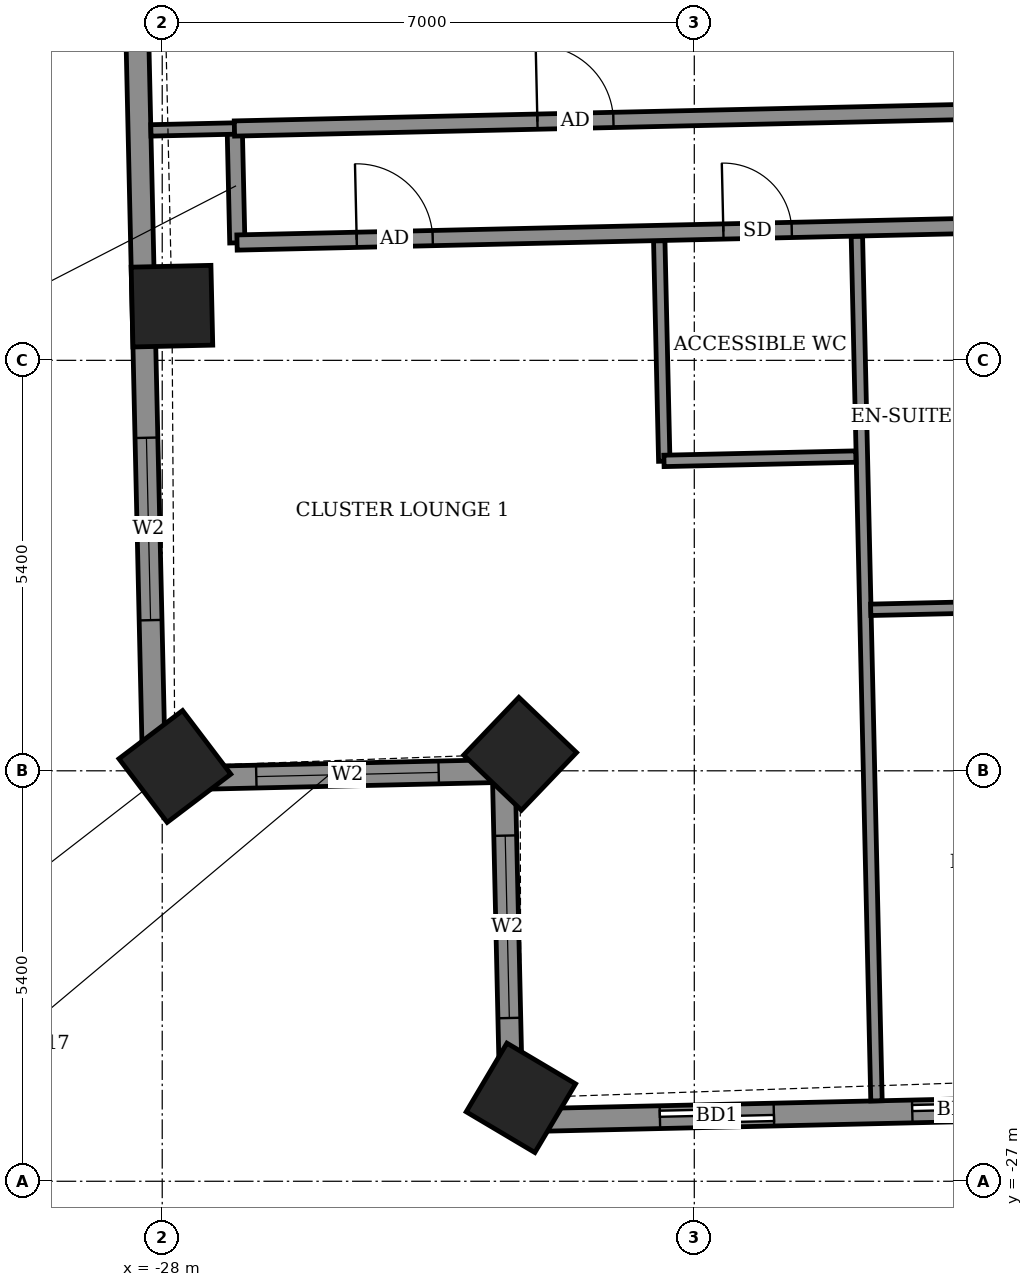
"""IFC4 building model, lengths in metres.
Left out: names, types, materials, properties, quantities, classifications, styles, units other than length and angle.
Written with IfcOpenShell. Run it as: python <this file> out.ifc"""

import sys

from ifc_helpers import new_model, si_unit, direction, frame, frame_2d, origin, origin_2d, place, context, subcontext, project, spatial, rectangle, extrude, element, fill, save


model = new_model("IFC4")
c1 = context("Model", 3, precision=1e-05, world=origin(), true_north=direction((0.0, 1.0)))
c2 = subcontext(c1, "Body", "Model", "MODEL_VIEW")
j1 = project(units=[si_unit("LENGTHUNIT", "METRE"), si_unit("PLANEANGLEUNIT", "RADIAN")], contexts=[c1])
p1 = place(None, origin())
s1 = spatial("IfcSite", under=j1, at=p1, CompositionType="ELEMENT")
p2 = place(p1, origin())
s2 = spatial("IfcBuilding", under=s1, at=p2, CompositionType="ELEMENT")
p3 = place(p2, frame((0.0, 0.0, 245.5)))
s3 = spatial("IfcBuildingStorey", under=s2, at=p3, CompositionType="ELEMENT", Elevation=245.5)
for number, where, z_axis, x_axis in (
    (1, (-27.872, -15.487, -0.55), (0.0, 0.0, 1.0), (0.023, -1.0, 0.0)),
    (2, (-27.833, -21.543, -0.55), (0.0, 0.0, 1.0), (0.604, -0.797, 0.0)),
    (3, (-23.291, -21.376, -0.55), (0.0, 0.0, 1.0), (0.723, -0.691, 0.0)),
    (4, (-23.281, -25.902, -0.55), (0.0, 0.0, 1.0), (0.86, -0.51, 0.0)),
):
    element("IfcColumn", number, at=place(p3, frame(where, z_axis=z_axis, x_axis=x_axis)), inside=s3, PredefinedType="COLUMN", context=c2, shape_type="SweptSolid", body=[
        extrude(rectangle(XDim=1.05, YDim=1.05, at=origin_2d()), origin(), (0.0, 0.0, 1.0), 3.6),
    ])
p4 = place(p3, frame((-28.403, -8.61, 0.0), z_axis=(0.0, 0.0, 1.0), x_axis=(0.022680342038, -0.999742767958, 0.0)))
e5 = element("IfcWall", 5, at=p4, inside=s3, PredefinedType="SOLIDWALL", context=c2, shape_type="SweptSolid", body=[
    extrude(rectangle(XDim=13.1, YDim=0.3, at=frame_2d((6.55, 0.0))), origin(), (0.0, 0.0, 1.0), 2.55),
])
p5 = place(p4, frame((1.937, 0.0, 0.0)))
e6 = element("IfcOpeningElement", 6, at=p5, cuts=e5, PredefinedType="OPENING", context=c2, shape_type="SweptSolid", body=[
    extrude(rectangle(XDim=1.5, YDim=2.4, at=frame_2d((0.75, 1.2))), frame((0.0, 0.16, 0.0), z_axis=(0.0, -1.0, 0.0), x_axis=(1.0, 0.0, 0.0)), (0.0, 0.0, 1.0), 0.32),
])
p6 = place(p4, frame((8.611, 0.0, 0.9)))
e7 = element("IfcOpeningElement", 7, at=p6, cuts=e5, PredefinedType="OPENING", context=c2, shape_type="SweptSolid", body=[
    extrude(rectangle(XDim=2.4, YDim=1.5, at=frame_2d((1.2, 0.75))), frame((0.0, 0.16, 0.0), z_axis=(0.0, -1.0, 0.0), x_axis=(1.0, 0.0, 0.0)), (0.0, 0.0, 1.0), 0.32),
])
p7 = place(p3, frame((-28.106, -21.707, 0.0), z_axis=(0.0, 0.0, 1.0), x_axis=(0.999739556364, 0.022821468877, 0.0)))
e8 = element("IfcWall", 8, at=p7, inside=s3, PredefinedType="SOLIDWALL", context=c2, shape_type="SweptSolid", body=[
    extrude(rectangle(XDim=4.6, YDim=0.3, at=frame_2d((2.3, 0.0))), origin(), (0.0, 0.0, 1.0), 2.55),
])
p8 = place(p7, frame((1.344, 0.0, 0.9)))
e9 = element("IfcOpeningElement", 9, at=p8, cuts=e8, PredefinedType="OPENING", context=c2, shape_type="SweptSolid", body=[
    extrude(rectangle(XDim=2.4, YDim=1.5, at=frame_2d((1.2, 0.75))), frame((0.0, 0.16, 0.0), z_axis=(0.0, -1.0, 0.0), x_axis=(1.0, 0.0, 0.0)), (0.0, 0.0, 1.0), 0.32),
])
p9 = place(p3, frame((-23.507, -21.602, 0.0), z_axis=(0.0, 0.0, 1.0), x_axis=(0.022609285172, -0.999744377441, 0.0)))
e10 = element("IfcWall", 10, at=p9, inside=s3, PredefinedType="SOLIDWALL", context=c2, shape_type="SweptSolid", body=[
    extrude(rectangle(XDim=4.6, YDim=0.3, at=frame_2d((2.3, 0.0))), origin(), (0.0, 0.0, 1.0), 2.55),
])
p10 = place(p9, frame((0.851, 0.0, 0.9)))
e11 = element("IfcOpeningElement", 11, at=p10, cuts=e10, PredefinedType="OPENING", context=c2, shape_type="SweptSolid", body=[
    extrude(rectangle(XDim=2.4, YDim=1.5, at=frame_2d((1.2, 0.75))), frame((0.0, 0.16, 0.0), z_axis=(0.0, -1.0, 0.0), x_axis=(1.0, 0.0, 0.0)), (0.0, 0.0, 1.0), 0.32),
])
p11 = place(p3, frame((-23.403, -26.201, 0.0), z_axis=(0.0, 0.0, 1.0), x_axis=(0.999742770494, 0.022680230258, 0.0)))
e12 = element("IfcWall", 12, at=p11, inside=s3, PredefinedType="SOLIDWALL", context=c2, shape_type="SweptSolid", body=[
    extrude(rectangle(XDim=43.908, YDim=0.3, at=frame_2d((21.954, 0.0))), origin(), (0.0, 0.0, 1.0), 2.55),
])
p12 = place(p11, frame((1.951, 0.0, 0.0)))
e13 = element("IfcOpeningElement", 13, at=p12, cuts=e12, PredefinedType="OPENING", context=c2, shape_type="SweptSolid", body=[
    extrude(rectangle(XDim=1.5, YDim=2.4, at=frame_2d((0.75, 1.2))), frame((0.0, 0.16, 0.0), z_axis=(0.0, -1.0, 0.0), x_axis=(1.0, 0.0, 0.0)), (0.0, 0.0, 1.0), 0.32),
])
p13 = place(p11, frame((5.272, 0.0, 0.0)))
e14 = element("IfcOpeningElement", 14, at=p13, cuts=e12, PredefinedType="OPENING", context=c2, shape_type="SweptSolid", body=[
    extrude(rectangle(XDim=1.2, YDim=2.4, at=frame_2d((0.6, 1.2))), frame((0.0, 0.16, 0.0), z_axis=(0.0, -1.0, 0.0), x_axis=(1.0, 0.0, 0.0)), (0.0, 0.0, 1.0), 0.32),
])
p14 = place(p11, frame((10.475, 0.0, 0.0)))
e15 = element("IfcOpeningElement", 15, at=p14, cuts=e12, PredefinedType="OPENING", context=c2, shape_type="SweptSolid", body=[
    extrude(rectangle(XDim=1.5, YDim=2.4, at=frame_2d((0.75, 1.2))), frame((0.0, 0.16, 0.0), z_axis=(0.0, -1.0, 0.0), x_axis=(1.0, 0.0, 0.0)), (0.0, 0.0, 1.0), 0.32),
])
p15 = place(p11, frame((15.53, 0.0, 0.0)))
e16 = element("IfcOpeningElement", 16, at=p15, cuts=e12, PredefinedType="OPENING", context=c2, shape_type="SweptSolid", body=[
    extrude(rectangle(XDim=1.5, YDim=2.4, at=frame_2d((0.75, 1.2))), frame((0.0, 0.16, 0.0), z_axis=(0.0, -1.0, 0.0), x_axis=(1.0, 0.0, 0.0)), (0.0, 0.0, 1.0), 0.32),
])
p16 = place(p11, frame((18.939, 0.0, 0.0)))
e17 = element("IfcOpeningElement", 17, at=p16, cuts=e12, PredefinedType="OPENING", context=c2, shape_type="SweptSolid", body=[
    extrude(rectangle(XDim=1.5, YDim=2.4, at=frame_2d((0.75, 1.2))), frame((0.0, 0.16, 0.0), z_axis=(0.0, -1.0, 0.0), x_axis=(1.0, 0.0, 0.0)), (0.0, 0.0, 1.0), 0.32),
])
p17 = place(p11, frame((23.489, 0.0, 0.0)))
e18 = element("IfcOpeningElement", 18, at=p17, cuts=e12, PredefinedType="OPENING", context=c2, shape_type="SweptSolid", body=[
    extrude(rectangle(XDim=1.5, YDim=2.4, at=frame_2d((0.75, 1.2))), frame((0.0, 0.16, 0.0), z_axis=(0.0, -1.0, 0.0), x_axis=(1.0, 0.0, 0.0)), (0.0, 0.0, 1.0), 0.32),
])
p18 = place(p11, frame((26.898, 0.0, 0.0)))
e19 = element("IfcOpeningElement", 19, at=p18, cuts=e12, PredefinedType="OPENING", context=c2, shape_type="SweptSolid", body=[
    extrude(rectangle(XDim=1.5, YDim=2.4, at=frame_2d((0.75, 1.2))), frame((0.0, 0.16, 0.0), z_axis=(0.0, -1.0, 0.0), x_axis=(1.0, 0.0, 0.0)), (0.0, 0.0, 1.0), 0.32),
])
p19 = place(p11, frame((32.05, 0.0, 0.0)))
e20 = element("IfcOpeningElement", 20, at=p19, cuts=e12, PredefinedType="OPENING", context=c2, shape_type="SweptSolid", body=[
    extrude(rectangle(XDim=1.5, YDim=2.4, at=frame_2d((0.75, 1.2))), frame((0.0, 0.16, 0.0), z_axis=(0.0, -1.0, 0.0), x_axis=(1.0, 0.0, 0.0)), (0.0, 0.0, 1.0), 0.32),
])
p20 = place(p11, frame((37.382, 0.0, 0.0)))
e21 = element("IfcOpeningElement", 21, at=p20, cuts=e12, PredefinedType="OPENING", context=c2, shape_type="SweptSolid", body=[
    extrude(rectangle(XDim=1.5, YDim=2.4, at=frame_2d((0.75, 1.2))), frame((0.0, 0.16, 0.0), z_axis=(0.0, -1.0, 0.0), x_axis=(1.0, 0.0, 0.0)), (0.0, 0.0, 1.0), 0.32),
])
p21 = place(p11, frame((40.057, 0.0, 0.9)))
e22 = element("IfcOpeningElement", 22, at=p21, cuts=e12, PredefinedType="OPENING", context=c2, shape_type="SweptSolid", body=[
    extrude(rectangle(XDim=2.4, YDim=1.5, at=frame_2d((1.2, 0.75))), frame((0.0, 0.16, 0.0), z_axis=(0.0, -1.0, 0.0), x_axis=(1.0, 0.0, 0.0)), (0.0, 0.0, 1.0), 0.32),
])
p22 = place(p3, frame((-18.603, -25.942, 0.0), z_axis=(0.0, 0.0, 1.0), x_axis=(-0.022684842063, 0.99974266586, 0.0)))
e23 = element("IfcWall", 23, at=p22, inside=s3, PredefinedType="PARTITIONING", context=c2, shape_type="SweptSolid", body=[
    extrude(rectangle(XDim=11.376, YDim=0.15, at=frame_2d((5.688, 0.0))), origin(), (0.0, 0.0, 1.0), 2.55),
])
p23 = place(p3, frame((-18.679, -19.482, 0.0), z_axis=(0.0, 0.0, 1.0), x_axis=(0.999740478815, 0.022781023197, 0.0)))
e24 = element("IfcWall", 24, at=p23, inside=s3, PredefinedType="PARTITIONING", context=c2, shape_type="SweptSolid", body=[
    extrude(rectangle(XDim=2.325, YDim=0.15, at=frame_2d((1.163, 0.0))), origin(), (0.0, 0.0, 1.0), 3.05),
])
p24 = place(p3, frame((-21.395, -17.527, 0.0), z_axis=(0.0, 0.0, 1.0), x_axis=(-0.022730967319, 0.999741618182, 0.0)))
e25 = element("IfcWall", 25, at=p24, inside=s3, PredefinedType="PARTITIONING", context=c2, shape_type="SweptSolid", body=[
    extrude(rectangle(XDim=2.9, YDim=0.15, at=frame_2d((1.45, 0.0))), origin(), (0.0, 0.0, 1.0), 3.05),
])
p25 = place(p3, frame((-21.399, -17.523, 0.0), z_axis=(0.0, 0.0, 1.0), x_axis=(0.9997461113, 0.022532486354, 0.0)))
e26 = element("IfcWall", 26, at=p25, inside=s3, PredefinedType="PARTITIONING", context=c2, shape_type="SweptSolid", body=[
    extrude(rectangle(XDim=2.525, YDim=0.15, at=frame_2d((1.262, 0.0))), origin(), (0.0, 0.0, 1.0), 3.05),
])
p26 = place(p3, frame((-27.012, -14.654, 0.0), z_axis=(0.0, 0.0, 1.0), x_axis=(-0.022617910375, 0.999744182344, 0.0)))
e27 = element("IfcWall", 27, at=p26, inside=s3, PredefinedType="PARTITIONING", context=c2, shape_type="SweptSolid", body=[
    extrude(rectangle(XDim=1.5, YDim=0.2, at=frame_2d((0.75, 0.0))), origin(), (0.0, 0.0, 1.0), 3.05),
])
p27 = place(p3, frame((-27.016, -14.65, 0.0), z_axis=(0.0, 0.0, 1.0), x_axis=(0.999742874861, 0.022675629315, 0.0)))
e28 = element("IfcWall", 28, at=p27, inside=s3, PredefinedType="PARTITIONING", context=c2, shape_type="SweptSolid", body=[
    extrude(rectangle(XDim=50.883, YDim=0.2, at=frame_2d((25.442, 0.0))), origin(), (0.0, 0.0, 1.0), 3.05),
])
p28 = place(p27, frame((1.575, 0.0, 0.0)))
e29 = element("IfcOpeningElement", 29, at=p28, cuts=e28, PredefinedType="OPENING", context=c2, shape_type="SweptSolid", body=[
    extrude(rectangle(XDim=1.0, YDim=2.1, at=frame_2d((0.5, 1.05))), frame((0.0, 0.11, 0.0), z_axis=(0.0, -1.0, 0.0), x_axis=(1.0, 0.0, 0.0)), (0.0, 0.0, 1.0), 0.22),
])
p29 = place(p27, frame((6.4, 0.0, 0.0)))
e30 = element("IfcOpeningElement", 30, at=p29, cuts=e28, PredefinedType="OPENING", context=c2, shape_type="SweptSolid", body=[
    extrude(rectangle(XDim=0.9, YDim=2.1, at=frame_2d((0.45, 1.05))), frame((0.0, 0.11, 0.0), z_axis=(0.0, -1.0, 0.0), x_axis=(1.0, 0.0, 0.0)), (0.0, 0.0, 1.0), 0.22),
])
p30 = place(p27, frame((11.025, 0.0, 0.0)))
e31 = element("IfcOpeningElement", 31, at=p30, cuts=e28, PredefinedType="OPENING", context=c2, shape_type="SweptSolid", body=[
    extrude(rectangle(XDim=0.9, YDim=2.1, at=frame_2d((0.45, 1.05))), frame((0.0, 0.11, 0.0), z_axis=(0.0, -1.0, 0.0), x_axis=(1.0, 0.0, 0.0)), (0.0, 0.0, 1.0), 0.22),
])
p31 = place(p27, frame((12.925, 0.0, 0.0)))
e32 = element("IfcOpeningElement", 32, at=p31, cuts=e28, PredefinedType="OPENING", context=c2, shape_type="SweptSolid", body=[
    extrude(rectangle(XDim=0.9, YDim=2.1, at=frame_2d((0.45, 1.05))), frame((0.0, 0.11, 0.0), z_axis=(0.0, -1.0, 0.0), x_axis=(1.0, 0.0, 0.0)), (0.0, 0.0, 1.0), 0.22),
])
p32 = place(p27, frame((19.65, 0.0, 0.0)))
e33 = element("IfcOpeningElement", 33, at=p32, cuts=e28, PredefinedType="OPENING", context=c2, shape_type="SweptSolid", body=[
    extrude(rectangle(XDim=0.9, YDim=2.1, at=frame_2d((0.45, 1.05))), frame((0.0, 0.11, 0.0), z_axis=(0.0, -1.0, 0.0), x_axis=(1.0, 0.0, 0.0)), (0.0, 0.0, 1.0), 0.22),
])
p33 = place(p27, frame((21.575, 0.0, 0.0)))
e34 = element("IfcOpeningElement", 34, at=p33, cuts=e28, PredefinedType="OPENING", context=c2, shape_type="SweptSolid", body=[
    extrude(rectangle(XDim=0.9, YDim=2.1, at=frame_2d((0.45, 1.05))), frame((0.0, 0.11, 0.0), z_axis=(0.0, -1.0, 0.0), x_axis=(1.0, 0.0, 0.0)), (0.0, 0.0, 1.0), 0.22),
])
p34 = place(p27, frame((28.25, 0.0, 0.0)))
e35 = element("IfcOpeningElement", 35, at=p34, cuts=e28, PredefinedType="OPENING", context=c2, shape_type="SweptSolid", body=[
    extrude(rectangle(XDim=0.9, YDim=2.1, at=frame_2d((0.45, 1.05))), frame((0.0, 0.11, 0.0), z_axis=(0.0, -1.0, 0.0), x_axis=(1.0, 0.0, 0.0)), (0.0, 0.0, 1.0), 0.22),
])
p35 = place(p27, frame((30.125, 0.0, 0.0)))
e36 = element("IfcOpeningElement", 36, at=p35, cuts=e28, PredefinedType="OPENING", context=c2, shape_type="SweptSolid", body=[
    extrude(rectangle(XDim=0.9, YDim=2.1, at=frame_2d((0.45, 1.05))), frame((0.0, 0.11, 0.0), z_axis=(0.0, -1.0, 0.0), x_axis=(1.0, 0.0, 0.0)), (0.0, 0.0, 1.0), 0.22),
])
p36 = place(p27, frame((36.9, 0.0, 0.0)))
e37 = element("IfcOpeningElement", 37, at=p36, cuts=e28, PredefinedType="OPENING", context=c2, shape_type="SweptSolid", body=[
    extrude(rectangle(XDim=0.9, YDim=2.1, at=frame_2d((0.45, 1.05))), frame((0.0, 0.11, 0.0), z_axis=(0.0, -1.0, 0.0), x_axis=(1.0, 0.0, 0.0)), (0.0, 0.0, 1.0), 0.22),
])
p37 = place(p27, frame((38.85, 0.0, 0.0)))
e38 = element("IfcOpeningElement", 38, at=p37, cuts=e28, PredefinedType="OPENING", context=c2, shape_type="SweptSolid", body=[
    extrude(rectangle(XDim=0.9, YDim=2.1, at=frame_2d((0.45, 1.05))), frame((0.0, 0.11, 0.0), z_axis=(0.0, -1.0, 0.0), x_axis=(1.0, 0.0, 0.0)), (0.0, 0.0, 1.0), 0.22),
])
p38 = place(p27, frame((48.629, 0.0, 0.0)))
e39 = element("IfcOpeningElement", 39, at=p38, cuts=e28, PredefinedType="OPENING", context=c2, shape_type="SweptSolid", body=[
    extrude(rectangle(XDim=1.0, YDim=2.1, at=frame_2d((0.5, 1.05))), frame((0.0, 0.11, 0.0), z_axis=(0.0, -1.0, 0.0), x_axis=(1.0, 0.0, 0.0)), (0.0, 0.0, 1.0), 0.22),
])
p39 = place(p27, frame((43.6, 0.0, 0.0)))
e40 = element("IfcOpeningElement", 40, at=p39, cuts=e28, PredefinedType="OPENING", context=c2, shape_type="SweptSolid", body=[
    extrude(rectangle(XDim=0.9, YDim=2.1, at=frame_2d((0.45, 1.05))), frame((0.0, 0.11, 0.0), z_axis=(0.0, -1.0, 0.0), x_axis=(1.0, 0.0, 0.0)), (0.0, 0.0, 1.0), 0.22),
])
p40 = place(p3, frame((-28.149, -13.175, 0.0), z_axis=(0.0, 0.0, 1.0), x_axis=(0.999740233734, 0.022791776024, 0.0)))
e41 = element("IfcWall", 41, at=p40, inside=s3, PredefinedType="PARTITIONING", context=c2, shape_type="SweptSolid", body=[
    extrude(rectangle(XDim=1.103, YDim=0.15, at=frame_2d((0.552, 0.0))), origin(), (0.0, 0.0, 1.0), 2.55),
])
p41 = place(p3, frame((-27.05, -13.15, 0.0), z_axis=(0.0, 0.0, 1.0), x_axis=(0.999743679035, 0.022640146404, 0.0)))
e42 = element("IfcWall", 42, at=p41, inside=s3, PredefinedType="PARTITIONING", context=c2, shape_type="SweptSolid", body=[
    extrude(rectangle(XDim=10.374, YDim=0.2, at=frame_2d((5.187, 0.0))), origin(), (0.0, 0.0, 1.0), 3.05),
])
p42 = place(p41, frame((3.987, 0.0, 0.0)))
e43 = element("IfcOpeningElement", 43, at=p42, cuts=e42, PredefinedType="OPENING", context=c2, shape_type="SweptSolid", body=[
    extrude(rectangle(XDim=1.0, YDim=2.1, at=frame_2d((0.5, 1.05))), frame((0.0, 0.11, 0.0), z_axis=(0.0, -1.0, 0.0), x_axis=(1.0, 0.0, 0.0)), (0.0, 0.0, 1.0), 0.22),
])
p43 = place(p6, origin())
e44 = element("IfcWindow", 44, at=p43, inside=s3, PartitioningType="DOUBLE_PANEL_VERTICAL", PredefinedType="WINDOW", context=c2, shape_type="SweptSolid", body=[
    extrude(rectangle(XDim=2.4, YDim=1.5, at=frame_2d((1.2, 0.75))), frame((0.0, 0.03, 0.0), z_axis=(0.0, -1.0, 0.0), x_axis=(1.0, 0.0, 0.0)), (0.0, 0.0, 1.0), 0.06),
])
fill(e7, e44)
p44 = place(p8, origin())
e45 = element("IfcWindow", 45, at=p44, inside=s3, PartitioningType="DOUBLE_PANEL_VERTICAL", PredefinedType="WINDOW", context=c2, shape_type="SweptSolid", body=[
    extrude(rectangle(XDim=2.4, YDim=1.5, at=frame_2d((1.2, 0.75))), frame((0.0, 0.03, 0.0), z_axis=(0.0, -1.0, 0.0), x_axis=(1.0, 0.0, 0.0)), (0.0, 0.0, 1.0), 0.06),
])
fill(e9, e45)
p45 = place(p10, origin())
e46 = element("IfcWindow", 46, at=p45, inside=s3, PartitioningType="DOUBLE_PANEL_VERTICAL", PredefinedType="WINDOW", context=c2, shape_type="SweptSolid", body=[
    extrude(rectangle(XDim=2.4, YDim=1.5, at=frame_2d((1.2, 0.75))), frame((0.0, 0.03, 0.0), z_axis=(0.0, -1.0, 0.0), x_axis=(1.0, 0.0, 0.0)), (0.0, 0.0, 1.0), 0.06),
])
fill(e11, e46)
p46 = place(p12, origin())
e47 = element("IfcDoor", 47, at=p46, inside=s3, OperationType="SLIDING_TO_LEFT", PredefinedType="DOOR", context=c2, shape_type="SweptSolid", body=[
    extrude(rectangle(XDim=1.5, YDim=2.4, at=frame_2d((0.75, 1.2))), frame((0.0, 0.025, 0.0), z_axis=(0.0, -1.0, 0.0), x_axis=(1.0, 0.0, 0.0)), (0.0, 0.0, 1.0), 0.05),
])
fill(e13, e47)
p47 = place(p13, origin())
e48 = element("IfcDoor", 48, at=p47, inside=s3, OperationType="SLIDING_TO_LEFT", PredefinedType="DOOR", context=c2, shape_type="SweptSolid", body=[
    extrude(rectangle(XDim=1.2, YDim=2.4, at=frame_2d((0.6, 1.2))), frame((0.0, 0.025, 0.0), z_axis=(0.0, -1.0, 0.0), x_axis=(1.0, 0.0, 0.0)), (0.0, 0.0, 1.0), 0.05),
])
fill(e14, e48)
p48 = place(p28, origin())
e49 = element("IfcDoor", 49, at=p48, inside=s3, OperationType="SINGLE_SWING_LEFT", PredefinedType="DOOR", context=c2, shape_type="SweptSolid", body=[
    extrude(rectangle(XDim=1.0, YDim=2.1, at=frame_2d((0.5, 1.05))), frame((0.0, 0.025, 0.0), z_axis=(0.0, -1.0, 0.0), x_axis=(1.0, 0.0, 0.0)), (0.0, 0.0, 1.0), 0.05),
])
fill(e29, e49)
p49 = place(p29, origin())
e50 = element("IfcDoor", 50, at=p49, inside=s3, OperationType="SINGLE_SWING_LEFT", PredefinedType="DOOR", context=c2, shape_type="SweptSolid", body=[
    extrude(rectangle(XDim=0.9, YDim=2.1, at=frame_2d((0.45, 1.05))), frame((0.0, 0.025, 0.0), z_axis=(0.0, -1.0, 0.0), x_axis=(1.0, 0.0, 0.0)), (0.0, 0.0, 1.0), 0.05),
])
fill(e30, e50)
p50 = place(p42, origin())
e51 = element("IfcDoor", 51, at=p50, inside=s3, OperationType="SINGLE_SWING_LEFT", PredefinedType="DOOR", context=c2, shape_type="SweptSolid", body=[
    extrude(rectangle(XDim=1.0, YDim=2.1, at=frame_2d((0.5, 1.05))), frame((0.0, 0.025, 0.0), z_axis=(0.0, -1.0, 0.0), x_axis=(1.0, 0.0, 0.0)), (0.0, 0.0, 1.0), 0.05),
])
fill(e43, e51)
save(model, sys.argv[1])
